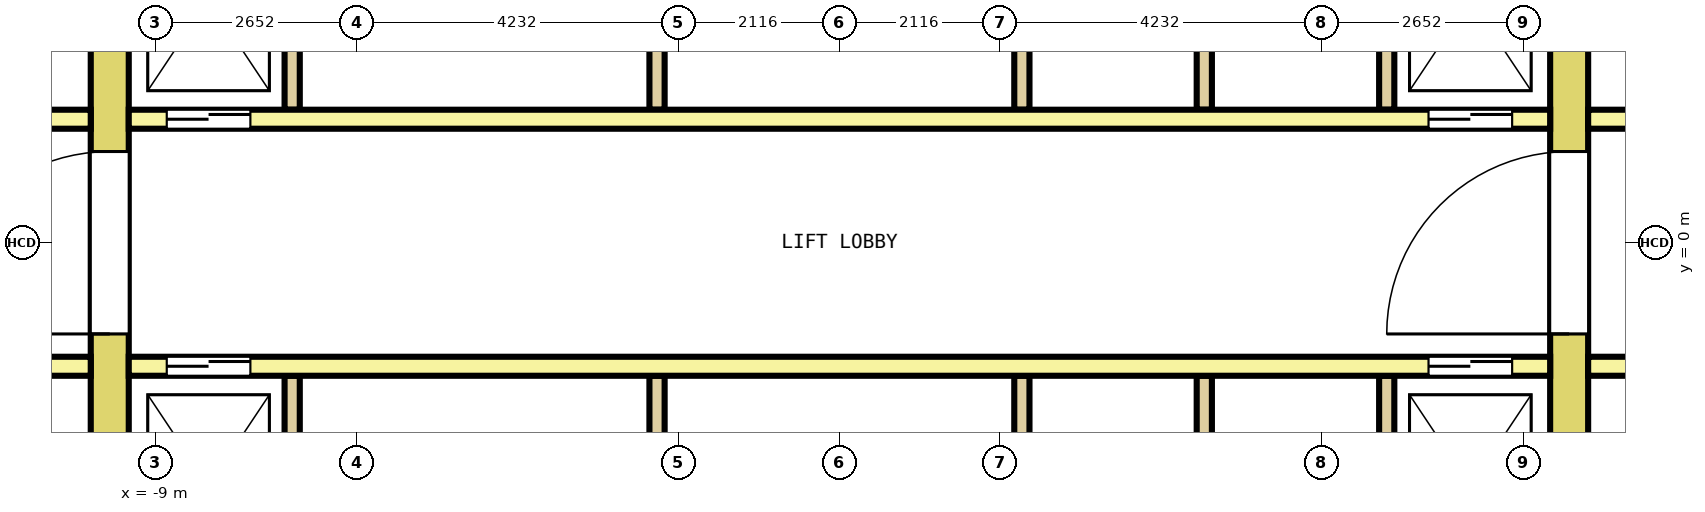
"""IFC4 building model, lengths in metres.
Left out: names, types, materials, properties, quantities, classifications, styles, units other than length and angle.
Written with IfcOpenShell. Run it as: python <this file> out.ifc"""

import sys

from ifc_helpers import new_model, si_unit, direction, frame, frame_2d, origin, place, context, subcontext, project, spatial, rectangle, extrude, element, fill, save


model = new_model("IFC4")
c1 = context("Model", 3, precision=1e-05, world=origin(), true_north=direction((0.0, 1.0)))
c2 = subcontext(c1, "Body", "Model", "MODEL_VIEW")
j1 = project(units=[si_unit("LENGTHUNIT", "METRE"), si_unit("PLANEANGLEUNIT", "RADIAN")], contexts=[c1])
p1 = place(None, origin())
s1 = spatial("IfcSite", under=j1, at=p1, CompositionType="ELEMENT")
p2 = place(p1, origin())
s2 = spatial("IfcBuilding", under=s1, at=p2, CompositionType="ELEMENT")
p3 = place(p2, frame((0.0, 0.0, 19.0)))
s3 = spatial("IfcBuildingStorey", under=s2, at=p3, CompositionType="ELEMENT", Elevation=19.0)
p4 = place(p3, frame((-9.6, -7.7, 0.0), z_axis=(0.0, 0.0, 1.0), x_axis=(0.0, 1.0, 0.0)))
e1 = element("IfcWall", 1, at=p4, inside=s3, PredefinedType="SHEAR", context=c2, shape_type="SweptSolid", body=[
    extrude(rectangle(XDim=15.4, YDim=0.5, at=frame_2d((7.7, 0.0))), origin(), (0.0, 0.0, 1.0), 4.1),
])
p5 = place(p4, frame((6.5, 0.0, 0.0)))
e2 = element("IfcOpeningElement", 2, at=p5, cuts=e1, PredefinedType="OPENING", context=c2, shape_type="SweptSolid", body=[
    extrude(rectangle(XDim=2.4, YDim=2.1, at=frame_2d((1.2, 1.05))), frame((0.0, 0.26, 0.0), z_axis=(0.0, -1.0, 0.0), x_axis=(1.0, 0.0, 0.0)), (0.0, 0.0, 1.0), 0.52),
])
p6 = place(p4, frame((13.4, 0.0, 0.0)))
e3 = element("IfcOpeningElement", 3, at=p6, cuts=e1, PredefinedType="OPENING", context=c2, shape_type="SweptSolid", body=[
    extrude(rectangle(XDim=1.2, YDim=2.1, at=frame_2d((0.6, 1.05))), frame((0.0, 0.26, 0.0), z_axis=(0.0, -1.0, 0.0), x_axis=(1.0, 0.0, 0.0)), (0.0, 0.0, 1.0), 0.52),
])
p7 = place(p4, frame((0.8, 0.0, 0.0)))
e4 = element("IfcOpeningElement", 4, at=p7, cuts=e1, PredefinedType="OPENING", context=c2, shape_type="SweptSolid", body=[
    extrude(rectangle(XDim=1.2, YDim=2.1, at=frame_2d((0.6, 1.05))), frame((0.0, 0.26, 0.0), z_axis=(0.0, -1.0, 0.0), x_axis=(1.0, 0.0, 0.0)), (0.0, 0.0, 1.0), 0.52),
])
p8 = place(p3, frame((9.6, -7.7, 0.0), z_axis=(0.0, 0.0, 1.0), x_axis=(0.0, 1.0, 0.0)))
e5 = element("IfcWall", 5, at=p8, inside=s3, PredefinedType="SHEAR", context=c2, shape_type="SweptSolid", body=[
    extrude(rectangle(XDim=15.4, YDim=0.5, at=frame_2d((7.7, 0.0))), origin(), (0.0, 0.0, 1.0), 4.1),
])
p9 = place(p8, frame((6.5, 0.0, 0.0)))
e6 = element("IfcOpeningElement", 6, at=p9, cuts=e5, PredefinedType="OPENING", context=c2, shape_type="SweptSolid", body=[
    extrude(rectangle(XDim=2.4, YDim=2.1, at=frame_2d((1.2, 1.05))), frame((0.0, 0.26, 0.0), z_axis=(0.0, -1.0, 0.0), x_axis=(1.0, 0.0, 0.0)), (0.0, 0.0, 1.0), 0.52),
])
p10 = place(p8, frame((13.4, 0.0, 0.0)))
e7 = element("IfcOpeningElement", 7, at=p10, cuts=e5, PredefinedType="OPENING", context=c2, shape_type="SweptSolid", body=[
    extrude(rectangle(XDim=1.2, YDim=2.1, at=frame_2d((0.6, 1.05))), frame((0.0, 0.26, 0.0), z_axis=(0.0, -1.0, 0.0), x_axis=(1.0, 0.0, 0.0)), (0.0, 0.0, 1.0), 0.52),
])
p11 = place(p8, frame((0.9, 0.0, 0.0)))
e8 = element("IfcOpeningElement", 8, at=p11, cuts=e5, PredefinedType="OPENING", context=c2, shape_type="SweptSolid", body=[
    extrude(rectangle(XDim=1.0, YDim=2.1, at=frame_2d((0.5, 1.05))), frame((0.0, 0.26, 0.0), z_axis=(0.0, -1.0, 0.0), x_axis=(1.0, 0.0, 0.0)), (0.0, 0.0, 1.0), 0.52),
])
p12 = place(p3, frame((-12.75, 1.625, 0.0), z_axis=(0.0, 0.0, 1.0), x_axis=(1.0, 0.0, 0.0)))
e9 = element("IfcWall", 9, at=p12, inside=s3, PredefinedType="SOLIDWALL", context=c2, shape_type="SweptSolid", body=[
    extrude(rectangle(XDim=2.9, YDim=0.25, at=frame_2d((1.45, 0.0))), origin(), (0.0, 0.0, 1.0), 4.1),
])
p13 = place(p12, frame((0.9, 0.0, 0.0)))
e10 = element("IfcOpeningElement", 10, at=p13, cuts=e9, PredefinedType="OPENING", context=c2, shape_type="SweptSolid", body=[
    extrude(rectangle(XDim=1.1, YDim=2.1, at=frame_2d((0.55, 1.05))), frame((0.0, 0.135, 0.0), z_axis=(0.0, -1.0, 0.0), x_axis=(1.0, 0.0, 0.0)), (0.0, 0.0, 1.0), 0.27),
])
p14 = place(p3, frame((-9.35, 1.625, 0.0), z_axis=(0.0, 0.0, 1.0), x_axis=(1.0, 0.0, 0.0)))
e11 = element("IfcWall", 11, at=p14, inside=s3, PredefinedType="SOLIDWALL", context=c2, shape_type="SweptSolid", body=[
    extrude(rectangle(XDim=18.7, YDim=0.25, at=frame_2d((9.35, 0.0))), origin(), (0.0, 0.0, 1.0), 4.1),
])
p15 = place(p14, frame((0.5, 0.0, 0.0)))
e12 = element("IfcOpeningElement", 12, at=p15, cuts=e11, PredefinedType="OPENING", context=c2, shape_type="SweptSolid", body=[
    extrude(rectangle(XDim=1.1, YDim=2.1, at=frame_2d((0.55, 1.05))), frame((0.0, 0.135, 0.0), z_axis=(0.0, -1.0, 0.0), x_axis=(1.0, 0.0, 0.0)), (0.0, 0.0, 1.0), 0.27),
])
p16 = place(p14, frame((17.1, 0.0, 0.0)))
e13 = element("IfcOpeningElement", 13, at=p16, cuts=e11, PredefinedType="OPENING", context=c2, shape_type="SweptSolid", body=[
    extrude(rectangle(XDim=1.1, YDim=2.1, at=frame_2d((0.55, 1.05))), frame((0.0, 0.135, 0.0), z_axis=(0.0, -1.0, 0.0), x_axis=(1.0, 0.0, 0.0)), (0.0, 0.0, 1.0), 0.27),
])
p17 = place(p3, frame((9.85, 1.625, 0.0), z_axis=(0.0, 0.0, 1.0), x_axis=(1.0, 0.0, 0.0)))
e14 = element("IfcWall", 14, at=p17, inside=s3, PredefinedType="SOLIDWALL", context=c2, shape_type="SweptSolid", body=[
    extrude(rectangle(XDim=2.9, YDim=0.25, at=frame_2d((1.45, 0.0))), origin(), (0.0, 0.0, 1.0), 4.1),
])
p18 = place(p17, frame((0.9, 0.0, 0.0)))
e15 = element("IfcOpeningElement", 15, at=p18, cuts=e14, PredefinedType="OPENING", context=c2, shape_type="SweptSolid", body=[
    extrude(rectangle(XDim=1.1, YDim=2.1, at=frame_2d((0.55, 1.05))), frame((0.0, 0.135, 0.0), z_axis=(0.0, -1.0, 0.0), x_axis=(1.0, 0.0, 0.0)), (0.0, 0.0, 1.0), 0.27),
])
for number, where, z_axis, x_axis in (
    (16, (-7.2, 1.75, 0.0), (0.0, 0.0, 1.0), (0.0, 1.0, 0.0)),
    (17, (-2.4, 1.75, 0.0), (0.0, 0.0, 1.0), (0.0, 1.0, 0.0)),
    (18, (2.4, 1.75, 0.0), (0.0, 0.0, 1.0), (0.0, 1.0, 0.0)),
    (19, (4.8, 1.75, 0.0), (0.0, 0.0, 1.0), (0.0, 1.0, 0.0)),
    (20, (7.2, 1.75, 0.0), (0.0, 0.0, 1.0), (0.0, 1.0, 0.0)),
):
    element("IfcWall", number, at=place(p3, frame(where, z_axis=z_axis, x_axis=x_axis)), inside=s3, PredefinedType="SOLIDWALL", context=c2, shape_type="SweptSolid", body=[
        extrude(rectangle(XDim=2.9, YDim=0.2, at=frame_2d((1.45, 0.0))), origin(), (0.0, 0.0, 1.0), 4.1),
    ])
p19 = place(p3, frame((-12.75, -1.625, 0.0), z_axis=(0.0, 0.0, 1.0), x_axis=(1.0, 0.0, 0.0)))
e21 = element("IfcWall", 21, at=p19, inside=s3, PredefinedType="SOLIDWALL", context=c2, shape_type="SweptSolid", body=[
    extrude(rectangle(XDim=2.9, YDim=0.25, at=frame_2d((1.45, 0.0))), origin(), (0.0, 0.0, 1.0), 4.1),
])
p20 = place(p19, frame((0.9, 0.0, 0.0)))
e22 = element("IfcOpeningElement", 22, at=p20, cuts=e21, PredefinedType="OPENING", context=c2, shape_type="SweptSolid", body=[
    extrude(rectangle(XDim=1.1, YDim=2.1, at=frame_2d((0.55, 1.05))), frame((0.0, 0.135, 0.0), z_axis=(0.0, -1.0, 0.0), x_axis=(1.0, 0.0, 0.0)), (0.0, 0.0, 1.0), 0.27),
])
p21 = place(p3, frame((-9.35, -1.625, 0.0), z_axis=(0.0, 0.0, 1.0), x_axis=(1.0, 0.0, 0.0)))
e23 = element("IfcWall", 23, at=p21, inside=s3, PredefinedType="SOLIDWALL", context=c2, shape_type="SweptSolid", body=[
    extrude(rectangle(XDim=18.7, YDim=0.25, at=frame_2d((9.35, 0.0))), origin(), (0.0, 0.0, 1.0), 4.1),
])
p22 = place(p21, frame((0.5, 0.0, 0.0)))
e24 = element("IfcOpeningElement", 24, at=p22, cuts=e23, PredefinedType="OPENING", context=c2, shape_type="SweptSolid", body=[
    extrude(rectangle(XDim=1.1, YDim=2.1, at=frame_2d((0.55, 1.05))), frame((0.0, 0.135, 0.0), z_axis=(0.0, -1.0, 0.0), x_axis=(1.0, 0.0, 0.0)), (0.0, 0.0, 1.0), 0.27),
])
p23 = place(p21, frame((17.1, 0.0, 0.0)))
e25 = element("IfcOpeningElement", 25, at=p23, cuts=e23, PredefinedType="OPENING", context=c2, shape_type="SweptSolid", body=[
    extrude(rectangle(XDim=1.1, YDim=2.1, at=frame_2d((0.55, 1.05))), frame((0.0, 0.135, 0.0), z_axis=(0.0, -1.0, 0.0), x_axis=(1.0, 0.0, 0.0)), (0.0, 0.0, 1.0), 0.27),
])
p24 = place(p3, frame((9.85, -1.625, 0.0), z_axis=(0.0, 0.0, 1.0), x_axis=(1.0, 0.0, 0.0)))
e26 = element("IfcWall", 26, at=p24, inside=s3, PredefinedType="SOLIDWALL", context=c2, shape_type="SweptSolid", body=[
    extrude(rectangle(XDim=2.9, YDim=0.25, at=frame_2d((1.45, 0.0))), origin(), (0.0, 0.0, 1.0), 4.1),
])
p25 = place(p24, frame((0.9, 0.0, 0.0)))
e27 = element("IfcOpeningElement", 27, at=p25, cuts=e26, PredefinedType="OPENING", context=c2, shape_type="SweptSolid", body=[
    extrude(rectangle(XDim=1.1, YDim=2.1, at=frame_2d((0.55, 1.05))), frame((0.0, 0.135, 0.0), z_axis=(0.0, -1.0, 0.0), x_axis=(1.0, 0.0, 0.0)), (0.0, 0.0, 1.0), 0.27),
])
for number, where, z_axis, x_axis in (
    (28, (-7.2, -4.65, 0.0), (0.0, 0.0, 1.0), (0.0, 1.0, 0.0)),
    (29, (-2.4, -4.65, 0.0), (0.0, 0.0, 1.0), (0.0, 1.0, 0.0)),
    (30, (2.4, -4.65, 0.0), (0.0, 0.0, 1.0), (0.0, 1.0, 0.0)),
    (31, (4.8, -4.65, 0.0), (0.0, 0.0, 1.0), (0.0, 1.0, 0.0)),
    (32, (7.2, -4.65, 0.0), (0.0, 0.0, 1.0), (0.0, 1.0, 0.0)),
):
    element("IfcWall", number, at=place(p3, frame(where, z_axis=z_axis, x_axis=x_axis)), inside=s3, PredefinedType="SOLIDWALL", context=c2, shape_type="SweptSolid", body=[
        extrude(rectangle(XDim=2.9, YDim=0.2, at=frame_2d((1.45, 0.0))), origin(), (0.0, 0.0, 1.0), 4.1),
    ])
p26 = place(p15, origin())
e33 = element("IfcDoor", 33, at=p26, inside=s3, OperationType="DOUBLE_DOOR_SLIDING", PredefinedType="DOOR", context=c2, shape_type="SweptSolid", body=[
    extrude(rectangle(XDim=1.1, YDim=2.1, at=frame_2d((0.55, 1.05))), frame((0.0, 0.075, 0.0), z_axis=(0.0, -1.0, 0.0), x_axis=(1.0, 0.0, 0.0)), (0.0, 0.0, 1.0), 0.15),
])
fill(e12, e33)
p27 = place(p16, origin())
e34 = element("IfcDoor", 34, at=p27, inside=s3, OperationType="DOUBLE_DOOR_SLIDING", PredefinedType="DOOR", context=c2, shape_type="SweptSolid", body=[
    extrude(rectangle(XDim=1.1, YDim=2.1, at=frame_2d((0.55, 1.05))), frame((0.0, 0.075, 0.0), z_axis=(0.0, -1.0, 0.0), x_axis=(1.0, 0.0, 0.0)), (0.0, 0.0, 1.0), 0.15),
])
fill(e13, e34)
p28 = place(p22, origin())
e35 = element("IfcDoor", 35, at=p28, inside=s3, OperationType="DOUBLE_DOOR_SLIDING", PredefinedType="DOOR", context=c2, shape_type="SweptSolid", body=[
    extrude(rectangle(XDim=1.1, YDim=2.1, at=frame_2d((0.55, 1.05))), frame((0.0, 0.075, 0.0), z_axis=(0.0, -1.0, 0.0), x_axis=(1.0, 0.0, 0.0)), (0.0, 0.0, 1.0), 0.15),
])
fill(e24, e35)
p29 = place(p23, origin())
e36 = element("IfcDoor", 36, at=p29, inside=s3, OperationType="DOUBLE_DOOR_SLIDING", PredefinedType="DOOR", context=c2, shape_type="SweptSolid", body=[
    extrude(rectangle(XDim=1.1, YDim=2.1, at=frame_2d((0.55, 1.05))), frame((0.0, 0.075, 0.0), z_axis=(0.0, -1.0, 0.0), x_axis=(1.0, 0.0, 0.0)), (0.0, 0.0, 1.0), 0.15),
])
fill(e25, e36)
p30 = place(p5, origin())
e37 = element("IfcDoor", 37, at=p30, inside=s3, OperationType="DOUBLE_DOOR_SINGLE_SWING", PredefinedType="DOOR", context=c2, shape_type="SweptSolid", body=[
    extrude(rectangle(XDim=2.4, YDim=2.1, at=frame_2d((1.2, 1.05))), frame((0.0, 0.2, 0.0), z_axis=(0.0, -1.0, 0.0), x_axis=(1.0, 0.0, 0.0)), (0.0, 0.0, 1.0), 0.4),
])
fill(e2, e37)
p31 = place(p9, origin())
e38 = element("IfcDoor", 38, at=p31, inside=s3, OperationType="DOUBLE_DOOR_SINGLE_SWING", PredefinedType="DOOR", context=c2, shape_type="SweptSolid", body=[
    extrude(rectangle(XDim=2.4, YDim=2.1, at=frame_2d((1.2, 1.05))), frame((0.0, 0.2, 0.0), z_axis=(0.0, -1.0, 0.0), x_axis=(1.0, 0.0, 0.0)), (0.0, 0.0, 1.0), 0.4),
])
fill(e6, e38)
save(model, sys.argv[1])
